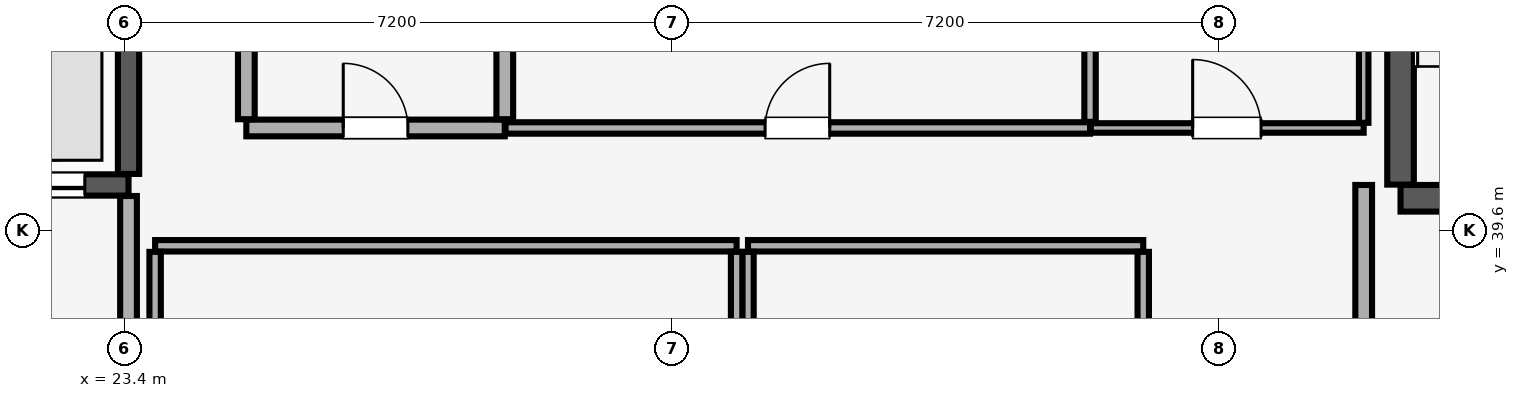
"""IFC4 building model, lengths in metres.
Left out: names, types, materials, properties, quantities, classifications, styles, units other than length and angle.
Written with IfcOpenShell. Run it as: python <this file> out.ifc"""

import sys

from ifc_helpers import new_model, si_unit, direction, frame, frame_2d, origin, place, context, subcontext, project, spatial, rectangle, extrude, element, fill, save


model = new_model("IFC4")
c1 = context("Model", 3, precision=1e-05, world=origin(), true_north=direction((0.0, 1.0)))
c2 = subcontext(c1, "Body", "Model", "MODEL_VIEW")
j1 = project(units=[si_unit("LENGTHUNIT", "METRE"), si_unit("PLANEANGLEUNIT", "RADIAN")], contexts=[c1])
p1 = place(None, origin())
s1 = spatial("IfcSite", under=j1, at=p1, CompositionType="ELEMENT")
p2 = place(p1, origin())
s2 = spatial("IfcBuilding", under=s1, at=p2, CompositionType="ELEMENT")
p3 = place(p2, frame((0.0, 0.0, 220.55)))
s3 = spatial("IfcBuildingStorey", under=s2, at=p3, CompositionType="ELEMENT", Elevation=220.55)
p4 = place(p3, frame((40.185, 40.025, 0.0), z_axis=(0.0, 0.0, 1.0), x_axis=(1.0, 0.0, 0.0)))
e1 = element("IfcWall", 1, at=p4, inside=s3, PredefinedType="SHEAR", context=c2, shape_type="SweptSolid", body=[
    extrude(rectangle(XDim=3.63, YDim=0.35, at=frame_2d((1.815, 0.0))), origin(), (0.0, 0.0, 1.0), 3.56),
])
p5 = place(p4, frame((1.24, 0.0, 0.0)))
e2 = element("IfcOpeningElement", 2, at=p5, cuts=e1, PredefinedType="OPENING", context=c2, shape_type="SweptSolid", body=[
    extrude(rectangle(XDim=1.15, YDim=2.15, at=frame_2d((0.575, 1.075))), frame((0.0, 0.185, 0.0), z_axis=(0.0, -1.0, 0.0), x_axis=(1.0, 0.0, 0.0)), (0.0, 0.0, 1.0), 0.37),
])
p6 = place(p3, frame((40.185, 40.205, 0.0), z_axis=(0.0, 0.0, 1.0), x_axis=(0.0, 1.0, 0.0)))
e3 = element("IfcWall", 3, at=p6, inside=s3, PredefinedType="SHEAR", context=c2, shape_type="SweptSolid", body=[
    extrude(rectangle(XDim=8.09, YDim=0.35, at=frame_2d((4.045, 0.0))), origin(), (0.0, 0.0, 1.0), 3.56),
])
p7 = place(p3, frame((21.035, 40.2, 0.0), z_axis=(0.0, 0.0, 1.0), x_axis=(1.0, 0.0, 0.0)))
e4 = element("IfcWall", 4, at=p7, inside=s3, PredefinedType="SHEAR", context=c2, shape_type="SweptSolid", body=[
    extrude(rectangle(XDim=2.415, YDim=0.28, at=frame_2d((1.208, 0.0))), origin(), (0.0, 0.0, 1.0), 3.56),
])
p8 = place(p7, frame((0.54, 0.0, 0.0)))
e5 = element("IfcOpeningElement", 5, at=p8, cuts=e4, PredefinedType="OPENING", context=c2, shape_type="SweptSolid", body=[
    extrude(rectangle(XDim=1.3, YDim=2.3, at=frame_2d((0.65, 1.15))), frame((0.0, 0.15, 0.0), z_axis=(0.0, -1.0, 0.0), x_axis=(1.0, 0.0, 0.0)), (0.0, 0.0, 1.0), 0.3),
])
p9 = place(p3, frame((23.45, 40.345, 0.0), z_axis=(0.0, 0.0, 1.0), x_axis=(0.0, 1.0, 0.0)))
e6 = element("IfcWall", 6, at=p9, inside=s3, PredefinedType="SHEAR", context=c2, shape_type="SweptSolid", body=[
    extrude(rectangle(XDim=2.81, YDim=0.28, at=frame_2d((1.405, 0.0))), origin(), (0.0, 0.0, 1.0), 3.56),
])
p10 = place(p3, frame((23.45, 34.415, 0.0), z_axis=(0.0, 0.0, 1.0), x_axis=(0.0, 1.0, 0.0)))
e7 = element("IfcWall", 7, at=p10, inside=s3, PredefinedType="PARTITIONING", context=c2, shape_type="SweptSolid", body=[
    extrude(rectangle(XDim=5.64, YDim=0.22, at=frame_2d((2.82, 0.0))), origin(), (0.0, 0.0, 1.0), 3.56),
])
p11 = place(p3, frame((39.7, 34.415, 0.0), z_axis=(0.0, 0.0, 1.0), x_axis=(0.0, 1.0, 0.0)))
e8 = element("IfcWall", 8, at=p11, inside=s3, PredefinedType="PARTITIONING", context=c2, shape_type="SweptSolid", body=[
    extrude(rectangle(XDim=5.785, YDim=0.22, at=frame_2d((2.893, 0.0))), origin(), (0.0, 0.0, 1.0), 3.56),
])
p12 = place(p3, frame((31.6, 39.4, 0.0), z_axis=(0.0, 0.0, 1.0), x_axis=(1.0, 0.0, 0.0)))
e9 = element("IfcWall", 9, at=p12, inside=s3, PredefinedType="PARTITIONING", context=c2, shape_type="SweptSolid", body=[
    extrude(rectangle(XDim=5.2, YDim=0.15, at=frame_2d((2.6, 0.0))), origin(), (0.0, 0.0, 1.0), 3.56),
])
for number, where, z_axis, x_axis in (
    (10, (31.6, 34.38, 0.0), (0.0, 0.0, 1.0), (0.0, 1.0, 0.0)),
    (11, (36.8, 34.38, 0.0), (0.0, 0.0, 1.0), (0.0, 1.0, 0.0)),
):
    element("IfcWall", number, at=place(p3, frame(where, z_axis=z_axis, x_axis=x_axis)), inside=s3, PredefinedType="PARTITIONING", context=c2, shape_type="SweptSolid", body=[
        extrude(rectangle(XDim=4.94, YDim=0.15, at=frame_2d((2.47, 0.0))), origin(), (0.0, 0.0, 1.0), 3.56),
    ])
p13 = place(p3, frame((23.8, 39.4, 0.0), z_axis=(0.0, 0.0, 1.0), x_axis=(1.0, 0.0, 0.0)))
e12 = element("IfcWall", 12, at=p13, inside=s3, PredefinedType="PARTITIONING", context=c2, shape_type="SweptSolid", body=[
    extrude(rectangle(XDim=7.65, YDim=0.15, at=frame_2d((3.825, 0.0))), origin(), (0.0, 0.0, 1.0), 3.56),
])
for number, where, z_axis, x_axis in (
    (13, (23.8, 34.38, 0.0), (0.0, 0.0, 1.0), (0.0, 1.0, 0.0)),
    (14, (31.45, 34.38, 0.0), (0.0, 0.0, 1.0), (0.0, 1.0, 0.0)),
):
    element("IfcWall", number, at=place(p3, frame(where, z_axis=z_axis, x_axis=x_axis)), inside=s3, PredefinedType="PARTITIONING", context=c2, shape_type="SweptSolid", body=[
        extrude(rectangle(XDim=4.94, YDim=0.15, at=frame_2d((2.47, 0.0))), origin(), (0.0, 0.0, 1.0), 3.56),
    ])
p14 = place(p3, frame((25.0, 40.95, 0.0), z_axis=(0.0, 0.0, 1.0), x_axis=(1.0, 0.0, 0.0)))
e15 = element("IfcWall", 15, at=p14, inside=s3, PredefinedType="PARTITIONING", context=c2, shape_type="SweptSolid", body=[
    extrude(rectangle(XDim=3.4, YDim=0.22, at=frame_2d((1.7, 0.0))), origin(), (0.0, 0.0, 1.0), 3.56),
])
p15 = place(p14, frame((1.275, 0.0, 0.0)))
e16 = element("IfcOpeningElement", 16, at=p15, cuts=e15, PredefinedType="OPENING", context=c2, shape_type="SweptSolid", body=[
    extrude(rectangle(XDim=0.85, YDim=2.1, at=frame_2d((0.425, 1.05))), frame((0.0, 0.12, 0.0), z_axis=(0.0, -1.0, 0.0), x_axis=(1.0, 0.0, 0.0)), (0.0, 0.0, 1.0), 0.24),
])
for number, where, z_axis, x_axis in (
    (17, (25.0, 41.065, 0.0), (0.0, 0.0, 1.0), (0.0, 1.0, 0.0)),
    (18, (28.4, 41.065, 0.0), (0.0, 0.0, 1.0), (0.0, 1.0, 0.0)),
):
    element("IfcWall", number, at=place(p3, frame(where, z_axis=z_axis, x_axis=x_axis)), inside=s3, PredefinedType="PARTITIONING", context=c2, shape_type="SweptSolid", body=[
        extrude(rectangle(XDim=7.785, YDim=0.22, at=frame_2d((3.893, 0.0))), origin(), (0.0, 0.0, 1.0), 3.56),
    ])
p16 = place(p3, frame((28.41, 40.95, 0.0), z_axis=(0.0, 0.0, 1.0), x_axis=(1.0, 0.0, 0.0)))
e19 = element("IfcWall", 19, at=p16, inside=s3, PredefinedType="PARTITIONING", context=c2, shape_type="SweptSolid", body=[
    extrude(rectangle(XDim=7.69, YDim=0.15, at=frame_2d((3.845, 0.0))), origin(), (0.0, 0.0, 1.0), 3.56),
])
p17 = place(p16, frame((3.415, 0.0, 0.0)))
e20 = element("IfcOpeningElement", 20, at=p17, cuts=e19, PredefinedType="OPENING", context=c2, shape_type="SweptSolid", body=[
    extrude(rectangle(XDim=0.85, YDim=2.1, at=frame_2d((0.425, 1.05))), frame((0.0, 0.085, 0.0), z_axis=(0.0, -1.0, 0.0), x_axis=(1.0, 0.0, 0.0)), (0.0, 0.0, 1.0), 0.17),
])
p18 = place(p3, frame((36.1, 41.03, 0.0), z_axis=(0.0, 0.0, 1.0), x_axis=(0.0, 1.0, 0.0)))
e21 = element("IfcWall", 21, at=p18, inside=s3, PredefinedType="PARTITIONING", context=c2, shape_type="SweptSolid", body=[
    extrude(rectangle(XDim=7.82, YDim=0.15, at=frame_2d((3.91, 0.0))), origin(), (0.0, 0.0, 1.0), 3.56),
])
p19 = place(p3, frame((36.11, 40.95, 0.0), z_axis=(0.0, 0.0, 1.0), x_axis=(1.0, 0.0, 0.0)))
e22 = element("IfcWall", 22, at=p19, inside=s3, PredefinedType="PARTITIONING", context=c2, shape_type="SweptSolid", body=[
    extrude(rectangle(XDim=3.59, YDim=0.125, at=frame_2d((1.795, 0.0))), origin(), (0.0, 0.0, 1.0), 3.56),
])
p20 = place(p19, frame((1.34, 0.0, 0.0)))
e23 = element("IfcOpeningElement", 23, at=p20, cuts=e22, PredefinedType="OPENING", context=c2, shape_type="SweptSolid", body=[
    extrude(rectangle(XDim=0.9, YDim=2.1, at=frame_2d((0.45, 1.05))), frame((0.0, 0.073, 0.0), z_axis=(0.0, -1.0, 0.0), x_axis=(1.0, 0.0, 0.0)), (0.0, 0.0, 1.0), 0.145),
])
p21 = place(p3, frame((39.7, 41.018, 0.0), z_axis=(0.0, 0.0, 1.0), x_axis=(0.0, 1.0, 0.0)))
e24 = element("IfcWall", 24, at=p21, inside=s3, PredefinedType="PARTITIONING", context=c2, shape_type="SweptSolid", body=[
    extrude(rectangle(XDim=3.715, YDim=0.125, at=frame_2d((1.857, 0.0))), origin(), (0.0, 0.0, 1.0), 3.56),
])
p22 = place(p8, origin())
e25 = element("IfcDoor", 25, at=p22, inside=s3, OperationType="DOUBLE_DOOR_SLIDING", PredefinedType="DOOR", context=c2, shape_type="SweptSolid", body=[
    extrude(rectangle(XDim=1.3, YDim=2.3, at=frame_2d((0.65, 1.15))), frame((0.0, 0.025, 0.0), z_axis=(0.0, -1.0, 0.0), x_axis=(1.0, 0.0, 0.0)), (0.0, 0.0, 1.0), 0.05),
])
fill(e5, e25)
p23 = place(p15, origin())
e26 = element("IfcDoor", 26, at=p23, inside=s3, OperationType="SINGLE_SWING_LEFT", PredefinedType="DOOR", context=c2, shape_type="SweptSolid", body=[
    extrude(rectangle(XDim=0.85, YDim=2.1, at=frame_2d((0.425, 1.05))), frame((0.0, 0.025, 0.0), z_axis=(0.0, -1.0, 0.0), x_axis=(1.0, 0.0, 0.0)), (0.0, 0.0, 1.0), 0.05),
])
fill(e16, e26)
p24 = place(p17, origin())
e27 = element("IfcDoor", 27, at=p24, inside=s3, OperationType="SINGLE_SWING_RIGHT", PredefinedType="DOOR", context=c2, shape_type="SweptSolid", body=[
    extrude(rectangle(XDim=0.85, YDim=2.1, at=frame_2d((0.425, 1.05))), frame((0.0, 0.025, 0.0), z_axis=(0.0, -1.0, 0.0), x_axis=(1.0, 0.0, 0.0)), (0.0, 0.0, 1.0), 0.05),
])
fill(e20, e27)
p25 = place(p20, origin())
e28 = element("IfcDoor", 28, at=p25, inside=s3, OperationType="SINGLE_SWING_LEFT", PredefinedType="DOOR", context=c2, shape_type="SweptSolid", body=[
    extrude(rectangle(XDim=0.9, YDim=2.1, at=frame_2d((0.45, 1.05))), frame((0.0, 0.025, 0.0), z_axis=(0.0, -1.0, 0.0), x_axis=(1.0, 0.0, 0.0)), (0.0, 0.0, 1.0), 0.05),
])
fill(e23, e28)
save(model, sys.argv[1])
